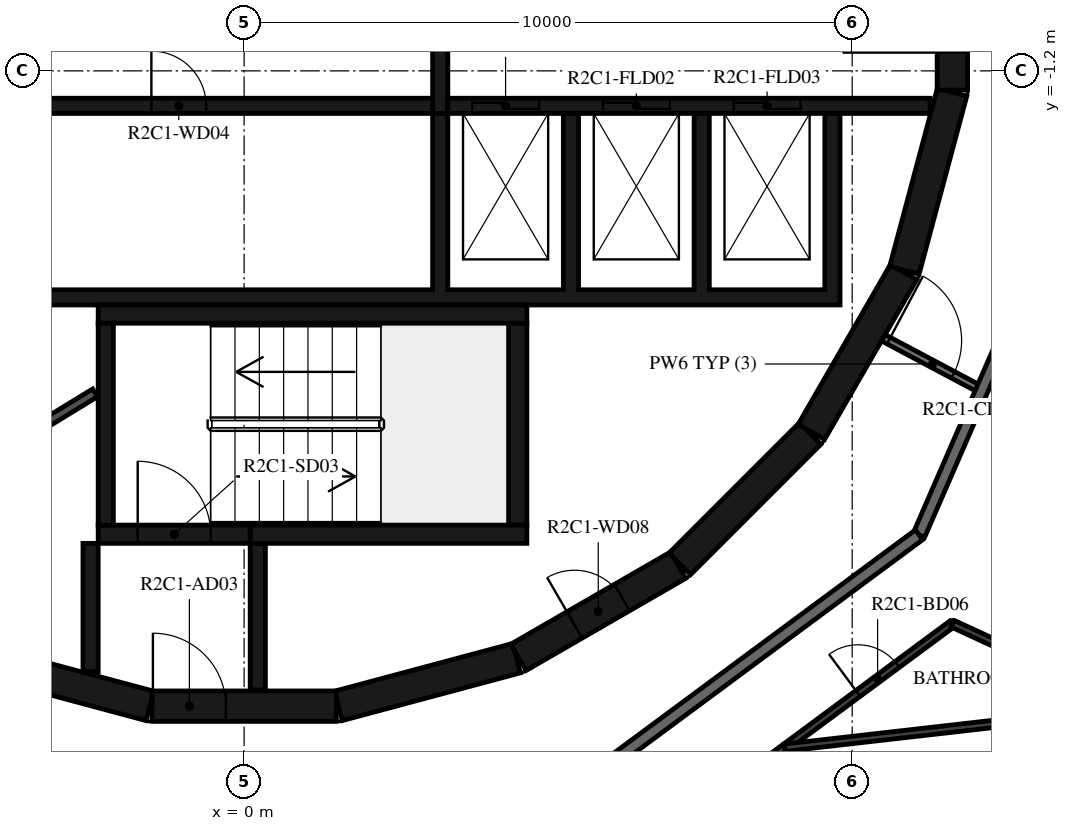
"""IFC4 building model, lengths in metres.
Left out: names, types, materials, properties, quantities, classifications, styles, units other than length and angle.
Written with IfcOpenShell. Run it as: python <this file> out.ifc"""

import sys

from ifc_helpers import new_model, si_unit, direction, frame, frame_2d, origin, place, context, subcontext, project, spatial, polyline, rectangle, outline, extrude, element, fill, save


model = new_model("IFC4")
c1 = context("Model", 3, precision=1e-05, world=origin(), true_north=direction((0.0, 1.0)))
c2 = subcontext(c1, "Body", "Model", "MODEL_VIEW")
j1 = project(units=[si_unit("LENGTHUNIT", "METRE"), si_unit("PLANEANGLEUNIT", "RADIAN")], contexts=[c1])
p1 = place(None, origin())
s1 = spatial("IfcSite", under=j1, at=p1, CompositionType="ELEMENT")
p2 = place(p1, origin())
s2 = spatial("IfcBuilding", under=s1, at=p2, CompositionType="ELEMENT")
p3 = place(p2, frame((0.0, 0.0, 101.2)))
s3 = spatial("IfcBuildingStorey", under=s2, at=p3, CompositionType="ELEMENT", Elevation=101.2)
p4 = place(p3, frame((1.55, -11.643, 0.0), z_axis=(0.0, 0.0, 1.0), x_axis=(0.965948410781, 0.258734743916, 0.0)))
e1 = element("IfcWall", 1, at=p4, inside=s3, PredefinedType="SHEAR", context=c2, shape_type="SweptSolid", body=[
    extrude(rectangle(XDim=3.033, YDim=0.5, at=frame_2d((1.516, 0.0))), origin(), (0.0, 0.0, 1.0), 3.12),
])
p5 = place(p3, frame((4.51, -10.845, 0.0), z_axis=(0.0, 0.0, 1.0), x_axis=(0.865975092491, 0.500087131594, 0.0)))
e2 = element("IfcWall", 2, at=p5, inside=s3, PredefinedType="SHEAR", context=c2, shape_type="SweptSolid", body=[
    extrude(rectangle(XDim=3.033, YDim=0.5, at=frame_2d((1.516, 0.0))), origin(), (0.0, 0.0, 1.0), 3.12),
])
p6 = place(p5, frame((1.066, 0.0, 0.0)))
e3 = element("IfcOpeningElement", 3, at=p6, cuts=e2, PredefinedType="OPENING", context=c2, shape_type="SweptSolid", body=[
    extrude(rectangle(XDim=0.9, YDim=2.1, at=frame_2d((0.45, 1.05))), frame((0.0, 0.26, 0.0), z_axis=(0.0, -1.0, 0.0), x_axis=(1.0, 0.0, 0.0)), (0.0, 0.0, 1.0), 0.52),
])
p7 = place(p3, frame((7.164, -9.308, 0.0), z_axis=(0.0, 0.0, 1.0), x_axis=(0.707106781187, 0.707106781187, 0.0)))
e4 = element("IfcWall", 4, at=p7, inside=s3, PredefinedType="SHEAR", context=c2, shape_type="SweptSolid", body=[
    extrude(rectangle(XDim=3.032, YDim=0.5, at=frame_2d((1.516, 0.0))), origin(), (0.0, 0.0, 1.0), 3.12),
])
for number, where, z_axis, x_axis in (
    (5, (9.329, -7.137, 0.0), (0.0, 0.0, 1.0), (0.5, 0.866, 0.0)),
    (6, (10.858, -4.479, 0.0), (0.0, 0.0, 1.0), (0.259, 0.966, 0.0)),
):
    element("IfcWall", number, at=place(p3, frame(where, z_axis=z_axis, x_axis=x_axis)), inside=s3, PredefinedType="SHEAR", context=c2, shape_type="SweptSolid", body=[
        extrude(rectangle(XDim=3.033, YDim=0.5, at=frame_2d((1.516, 0.0))), origin(), (0.0, 0.0, 1.0), 3.12),
    ])
p8 = place(p3, frame((11.647, -1.516, 0.0), z_axis=(0.0, 0.0, 1.0), x_axis=(0.0, 1.0, 0.0)))
e7 = element("IfcWall", 7, at=p8, inside=s3, PredefinedType="SHEAR", context=c2, shape_type="SweptSolid", body=[
    extrude(rectangle(XDim=3.033, YDim=0.5, at=frame_2d((1.516, 0.0))), origin(), (0.0, 0.0, 1.0), 3.12),
])
p9 = place(p8, frame((0.616, 0.0, 0.0)))
e8 = element("IfcOpeningElement", 8, at=p9, cuts=e7, PredefinedType="OPENING", context=c2, shape_type="SweptSolid", body=[
    extrude(rectangle(XDim=1.8, YDim=2.1, at=frame_2d((0.9, 1.05))), frame((0.0, 0.26, 0.0), z_axis=(0.0, -1.0, 0.0), x_axis=(1.0, 0.0, 0.0)), (0.0, 0.0, 1.0), 0.52),
])
p10 = place(p3, frame((-4.479, -10.858, 0.0), z_axis=(0.0, 0.0, 1.0), x_axis=(0.965948410781, -0.258734743916, 0.0)))
e9 = element("IfcWall", 9, at=p10, inside=s3, PredefinedType="SHEAR", context=c2, shape_type="SweptSolid", body=[
    extrude(rectangle(XDim=3.033, YDim=0.5, at=frame_2d((1.516, 0.0))), origin(), (0.0, 0.0, 1.0), 3.12),
])
p11 = place(p3, frame((-1.516, -11.647, 0.0), z_axis=(0.0, 0.0, 1.0), x_axis=(1.0, 0.0, 0.0)))
e10 = element("IfcWall", 10, at=p11, inside=s3, PredefinedType="SHEAR", context=c2, shape_type="SweptSolid", body=[
    extrude(rectangle(XDim=3.033, YDim=0.5, at=frame_2d((1.516, 0.0))), origin(), (0.0, 0.0, 1.0), 3.12),
])
p12 = place(p11, frame((0.016, 0.0, 0.0)))
e11 = element("IfcOpeningElement", 11, at=p12, cuts=e10, PredefinedType="OPENING", context=c2, shape_type="SweptSolid", body=[
    extrude(rectangle(XDim=1.2, YDim=2.1, at=frame_2d((0.6, 1.05))), frame((0.0, 0.26, 0.0), z_axis=(0.0, -1.0, 0.0), x_axis=(1.0, 0.0, 0.0)), (0.0, 0.0, 1.0), 0.52),
])
p13 = place(p3, frame((-2.275, -8.67, 0.0), z_axis=(0.0, 0.0, 1.0), x_axis=(0.0, 1.0, 0.0)))
e12 = element("IfcWall", 12, at=p13, inside=s3, PredefinedType="SHEAR", context=c2, shape_type="SweptSolid", body=[
    extrude(rectangle(XDim=3.32, YDim=0.25, at=frame_2d((1.66, 0.0))), origin(), (0.0, 0.0, 1.0), 3.12),
])
p14 = place(p3, frame((-2.4, -5.2, 0.0), z_axis=(0.0, 0.0, 1.0), x_axis=(1.0, 0.0, 0.0)))
e13 = element("IfcWall", 13, at=p14, inside=s3, PredefinedType="SHEAR", context=c2, shape_type="SweptSolid", body=[
    extrude(rectangle(XDim=7.05, YDim=0.3, at=frame_2d((3.525, 0.0))), origin(), (0.0, 0.0, 1.0), 3.12),
])
p15 = place(p3, frame((4.5, -8.67, 0.0), z_axis=(0.0, 0.0, 1.0), x_axis=(0.0, 1.0, 0.0)))
e14 = element("IfcWall", 14, at=p15, inside=s3, PredefinedType="SHEAR", context=c2, shape_type="SweptSolid", body=[
    extrude(rectangle(XDim=3.32, YDim=0.3, at=frame_2d((1.66, 0.0))), origin(), (0.0, 0.0, 1.0), 3.12),
])
p16 = place(p3, frame((0.1, -8.82, 0.0), z_axis=(0.0, 0.0, 1.0), x_axis=(1.0, 0.0, 0.0)))
e15 = element("IfcWall", 15, at=p16, inside=s3, PredefinedType="SHEAR", context=c2, shape_type="SweptSolid", body=[
    extrude(rectangle(XDim=4.55, YDim=0.3, at=frame_2d((2.275, 0.0))), origin(), (0.0, 0.0, 1.0), 3.12),
])
p17 = place(p3, frame((-2.4, -8.82, 0.0), z_axis=(0.0, 0.0, 1.0), x_axis=(1.0, 0.0, 0.0)))
e16 = element("IfcWall", 16, at=p17, inside=s3, PredefinedType="SHEAR", context=c2, shape_type="SweptSolid", body=[
    extrude(rectangle(XDim=2.5, YDim=0.3, at=frame_2d((1.25, 0.0))), origin(), (0.0, 0.0, 1.0), 3.12),
])
p18 = place(p17, frame((0.65, 0.0, 0.0)))
e17 = element("IfcOpeningElement", 17, at=p18, cuts=e16, PredefinedType="OPENING", context=c2, shape_type="SweptSolid", body=[
    extrude(rectangle(XDim=1.2, YDim=2.1, at=frame_2d((0.6, 1.05))), frame((0.0, 0.16, 0.0), z_axis=(0.0, -1.0, 0.0), x_axis=(1.0, 0.0, 0.0)), (0.0, 0.0, 1.0), 0.32),
])
p19 = place(p3, frame((-2.525, -8.97, 0.0), z_axis=(0.0, 0.0, 1.0), x_axis=(0.0, -1.0, 0.0)))
e18 = element("IfcWall", 18, at=p19, inside=s3, PredefinedType="SHEAR", context=c2, shape_type="SweptSolid", body=[
    extrude(rectangle(XDim=2.11, YDim=0.25, at=frame_2d((1.055, 0.0))), origin(), (0.0, 0.0, 1.0), 3.12),
])
p20 = place(p3, frame((0.225, -8.97, 0.0), z_axis=(0.0, 0.0, 1.0), x_axis=(0.0, -1.0, 0.0)))
e19 = element("IfcWall", 19, at=p20, inside=s3, PredefinedType="SHEAR", context=c2, shape_type="SweptSolid", body=[
    extrude(rectangle(XDim=2.41, YDim=0.25, at=frame_2d((1.205, 0.0))), origin(), (0.0, 0.0, 1.0), 3.12),
])
p21 = place(p3, origin())
e20 = element("IfcWall", 20, at=p21, inside=s3, PredefinedType="SHEAR", context=c2, shape_type="SweptSolid", body=[
    extrude(outline(polyline([(9.8, -5.05), (9.8, -4.8), (9.8, -1.9), (9.55, -1.9), (9.55, -4.8), (7.65, -4.8), (7.65, -1.9), (7.4, -1.9), (7.4, -4.8), (5.5, -4.8), (5.5, -1.9), (5.25, -1.9), (5.25, -4.8), (3.35, -4.8), (3.35, -1.9), (3.1, -1.9), (3.1, -4.8), (-5.25, -4.8), (-5.25, -1.9), (-5.5, -1.9), (-5.5, -4.8), (-7.4, -4.8), (-7.4, -1.9), (-7.65, -1.9), (-7.65, -4.8), (-9.55, -4.8), (-9.55, -1.9), (-9.8, -1.9), (-9.8, -4.8), (-9.8, -5.05), (9.8, -5.05)])), origin(), (0.0, 0.0, 1.0), 3.12),
])
p22 = place(p3, frame((-11.28, -1.775, 0.0), z_axis=(0.0, 0.0, 1.0), x_axis=(1.0, 0.0, 0.0)))
e21 = element("IfcWall", 21, at=p22, inside=s3, PredefinedType="SHEAR", context=c2, shape_type="SweptSolid", body=[
    extrude(rectangle(XDim=14.38, YDim=0.25, at=frame_2d((7.19, 0.0))), origin(), (0.0, 0.0, 1.0), 3.12),
])
p23 = place(p22, frame((9.755, 0.0, 0.0)))
e22 = element("IfcOpeningElement", 22, at=p23, cuts=e21, PredefinedType="OPENING", context=c2, shape_type="SweptSolid", body=[
    extrude(rectangle(XDim=0.9, YDim=2.1, at=frame_2d((0.45, 1.05))), frame((0.0, 0.135, 0.0), z_axis=(0.0, -1.0, 0.0), x_axis=(1.0, 0.0, 0.0)), (0.0, 0.0, 1.0), 0.27),
])
p24 = place(p3, frame((3.35, -1.775, 0.0), z_axis=(0.0, 0.0, 1.0), x_axis=(1.0, 0.0, 0.0)))
e23 = element("IfcWall", 23, at=p24, inside=s3, PredefinedType="SHEAR", context=c2, shape_type="SweptSolid", body=[
    extrude(rectangle(XDim=7.93, YDim=0.25, at=frame_2d((3.965, 0.0))), origin(), (0.0, 0.0, 1.0), 3.12),
])
p25 = place(p24, frame((0.4, 0.0, 0.0)))
e24 = element("IfcOpeningElement", 24, at=p25, cuts=e23, PredefinedType="OPENING", context=c2, shape_type="SweptSolid", body=[
    extrude(rectangle(XDim=1.1, YDim=2.4, at=frame_2d((0.55, 1.2))), frame((0.0, 0.135, 0.0), z_axis=(0.0, -1.0, 0.0), x_axis=(1.0, 0.0, 0.0)), (0.0, 0.0, 1.0), 0.27),
])
p26 = place(p24, frame((2.55, 0.0, 0.0)))
e25 = element("IfcOpeningElement", 25, at=p26, cuts=e23, PredefinedType="OPENING", context=c2, shape_type="SweptSolid", body=[
    extrude(rectangle(XDim=1.1, YDim=2.4, at=frame_2d((0.55, 1.2))), frame((0.0, 0.135, 0.0), z_axis=(0.0, -1.0, 0.0), x_axis=(1.0, 0.0, 0.0)), (0.0, 0.0, 1.0), 0.27),
])
p27 = place(p24, frame((4.7, 0.0, 0.0)))
e26 = element("IfcOpeningElement", 26, at=p27, cuts=e23, PredefinedType="OPENING", context=c2, shape_type="SweptSolid", body=[
    extrude(rectangle(XDim=1.1, YDim=2.4, at=frame_2d((0.55, 1.2))), frame((0.0, 0.135, 0.0), z_axis=(0.0, -1.0, 0.0), x_axis=(1.0, 0.0, 0.0)), (0.0, 0.0, 1.0), 0.27),
])
p28 = place(p3, frame((3.225, -1.9, 0.0), z_axis=(0.0, 0.0, 1.0), x_axis=(0.0, 1.0, 0.0)))
e27 = element("IfcWall", 27, at=p28, inside=s3, PredefinedType="SHEAR", context=c2, shape_type="SweptSolid", body=[
    extrude(rectangle(XDim=3.8, YDim=0.25, at=frame_2d((1.9, 0.0))), origin(), (0.0, 0.0, 1.0), 3.12),
])
p29 = place(p3, frame((-2.451, -6.495, 0.0), z_axis=(0.0, 0.0, 1.0), x_axis=(-0.853250115418, -0.521501908471, 0.0)))
e28 = element("IfcWall", 28, at=p29, inside=s3, PredefinedType="PARTITIONING", context=c2, shape_type="SweptSolid", body=[
    extrude(rectangle(XDim=5.137, YDim=0.15, at=frame_2d((2.569, 0.0))), origin(), (0.0, 0.0, 1.0), 3.12),
])
p30 = place(p29, frame((2.119, 0.0, 0.0)))
e29 = element("IfcOpeningElement", 29, at=p30, cuts=e28, PredefinedType="OPENING", context=c2, shape_type="SweptSolid", body=[
    extrude(rectangle(XDim=0.9, YDim=2.1, at=frame_2d((0.45, 1.05))), frame((0.0, 0.085, 0.0), z_axis=(0.0, -1.0, 0.0), x_axis=(1.0, 0.0, 0.0)), (0.0, 0.0, 1.0), 0.17),
])
p31 = place(p3, frame((10.511, -5.589, 0.0), z_axis=(0.0, 0.0, 1.0), x_axis=(0.882962602189, -0.469443333253, 0.0)))
e30 = element("IfcWall", 30, at=p31, inside=s3, PredefinedType="PARTITIONING", context=c2, shape_type="SweptSolid", body=[
    extrude(rectangle(XDim=1.838, YDim=0.12, at=frame_2d((0.919, 0.0))), origin(), (0.0, 0.0, 1.0), 3.12),
])
p32 = place(p31, frame((0.1, 0.0, 0.0)))
e31 = element("IfcOpeningElement", 31, at=p32, cuts=e30, PredefinedType="OPENING", context=c2, shape_type="SweptSolid", body=[
    extrude(rectangle(XDim=1.2, YDim=2.1, at=frame_2d((0.6, 1.05))), frame((0.0, 0.07, 0.0), z_axis=(0.0, -1.0, 0.0), x_axis=(1.0, 0.0, 0.0)), (0.0, 0.0, 1.0), 0.14),
])
p33 = place(p3, frame((11.1, -8.829, 0.0), z_axis=(0.0, 0.0, 1.0), x_axis=(0.398741918631, 0.917063183388, 0.0)))
e32 = element("IfcWall", 32, at=p33, inside=s3, PredefinedType="STANDARD", context=c2, shape_type="SweptSolid", body=[
    extrude(rectangle(XDim=7.342, YDim=0.2, at=frame_2d((3.671, 0.0))), origin(), (0.0, 0.0, 1.0), 3.12),
])
p34 = place(p3, frame((-8.829, -11.1, 0.0), z_axis=(0.0, 0.0, 1.0), x_axis=(0.917063622491, -0.398740908742, 0.0)))
e33 = element("IfcWall", 33, at=p34, inside=s3, PredefinedType="STANDARD", context=c2, shape_type="SweptSolid", body=[
    extrude(rectangle(XDim=7.24, YDim=0.2, at=frame_2d((3.62, 0.0))), origin(), (0.0, 0.0, 1.0), 3.12),
])
p35 = place(p34, frame((6.04, 0.0, 0.0)))
e34 = element("IfcOpeningElement", 34, at=p35, cuts=e33, PredefinedType="OPENING", context=c2, shape_type="SweptSolid", body=[
    extrude(rectangle(XDim=1.0, YDim=2.1, at=frame_2d((0.5, 1.05))), frame((0.0, 0.11, 0.0), z_axis=(0.0, -1.0, 0.0), x_axis=(1.0, 0.0, 0.0)), (0.0, 0.0, 1.0), 0.22),
])
p36 = place(p3, frame((5.198, -13.196, 0.0), z_axis=(0.0, 0.0, 1.0), x_axis=(0.803869883159, 0.594805187394, 0.0)))
e35 = element("IfcWall", 35, at=p36, inside=s3, PredefinedType="STANDARD", context=c2, shape_type="SweptSolid", body=[
    extrude(rectangle(XDim=7.342, YDim=0.2, at=frame_2d((3.671, 0.0))), origin(), (0.0, 0.0, 1.0), 3.12),
])
p37 = place(p3, frame((-9.562, -12.417, 0.0), z_axis=(0.0, 0.0, 1.0), x_axis=(0.917063169851, -0.398741949767, 0.0)))
e36 = element("IfcWall", 36, at=p37, inside=s3, PredefinedType="PARTITIONING", context=c2, shape_type="SweptSolid", body=[
    extrude(rectangle(XDim=7.891, YDim=0.12, at=frame_2d((3.946, 0.0))), origin(), (0.0, 0.0, 1.0), 3.12),
])
p38 = place(p37, frame((0.715, 0.0, 0.0)))
e37 = element("IfcOpeningElement", 37, at=p38, cuts=e36, PredefinedType="OPENING", context=c2, shape_type="SweptSolid", body=[
    extrude(rectangle(XDim=0.8, YDim=2.1, at=frame_2d((0.4, 1.05))), frame((0.0, 0.07, 0.0), z_axis=(0.0, -1.0, 0.0), x_axis=(1.0, 0.0, 0.0)), (0.0, 0.0, 1.0), 0.14),
])
p39 = place(p3, frame((5.767, -14.641, 0.0), z_axis=(0.0, 0.0, 1.0), x_axis=(0.803867427863, 0.594808505673, 0.0)))
e38 = element("IfcWall", 38, at=p39, inside=s3, PredefinedType="PARTITIONING", context=c2, shape_type="SweptSolid", body=[
    extrude(rectangle(XDim=7.316, YDim=0.12, at=frame_2d((3.658, 0.0))), origin(), (0.0, 0.0, 1.0), 3.12),
])
p40 = place(p39, frame((0.2, 0.0, 0.0)))
e39 = element("IfcOpeningElement", 39, at=p40, cuts=e38, PredefinedType="OPENING", context=c2, shape_type="SweptSolid", body=[
    extrude(rectangle(XDim=0.9, YDim=2.1, at=frame_2d((0.45, 1.05))), frame((0.0, 0.07, 0.0), z_axis=(0.0, -1.0, 0.0), x_axis=(1.0, 0.0, 0.0)), (0.0, 0.0, 1.0), 0.14),
])
p41 = place(p39, frame((5.385, 0.0, 0.0)))
e40 = element("IfcOpeningElement", 40, at=p41, cuts=e38, PredefinedType="OPENING", context=c2, shape_type="SweptSolid", body=[
    extrude(rectangle(XDim=0.8, YDim=2.1, at=frame_2d((0.4, 1.05))), frame((0.0, 0.07, 0.0), z_axis=(0.0, -1.0, 0.0), x_axis=(1.0, 0.0, 0.0)), (0.0, 0.0, 1.0), 0.14),
])
p42 = place(p3, frame((11.649, -10.289, 0.0), z_axis=(0.0, 0.0, 1.0), x_axis=(0.9079269461, -0.419128453514, 0.0)))
e41 = element("IfcWall", 41, at=p42, inside=s3, PredefinedType="PARTITIONING", context=c2, shape_type="SweptSolid", body=[
    extrude(rectangle(XDim=3.304, YDim=0.12, at=frame_2d((1.652, 0.0))), origin(), (0.0, 0.0, 1.0), 3.12),
])
p43 = place(p3, frame((14.649, -11.674, 0.0), z_axis=(0.0, 0.0, 1.0), x_axis=(-0.993573746873, -0.113186613721, 0.0)))
e42 = element("IfcWall", 42, at=p43, inside=s3, PredefinedType="PARTITIONING", context=c2, shape_type="SweptSolid", body=[
    extrude(rectangle(XDim=5.796, YDim=0.12, at=frame_2d((2.898, 0.0))), origin(), (0.0, 0.0, 1.0), 3.12),
])
p44 = place(p18, origin())
e43 = element("IfcDoor", 43, at=p44, inside=s3, OperationType="SINGLE_SWING_LEFT", PredefinedType="DOOR", context=c2, shape_type="SweptSolid", body=[
    extrude(rectangle(XDim=1.2, YDim=2.1, at=frame_2d((0.6, 1.05))), frame((0.0, 0.025, 0.0), z_axis=(0.0, -1.0, 0.0), x_axis=(1.0, 0.0, 0.0)), (0.0, 0.0, 1.0), 0.05),
])
fill(e17, e43)
p45 = place(p12, origin())
e44 = element("IfcDoor", 44, at=p45, inside=s3, OperationType="SINGLE_SWING_RIGHT", PredefinedType="DOOR", context=c2, shape_type="SweptSolid", body=[
    extrude(rectangle(XDim=1.2, YDim=2.1, at=frame_2d((0.6, 1.05))), frame((0.0, 0.025, 0.0), z_axis=(0.0, -1.0, 0.0), x_axis=(1.0, 0.0, 0.0)), (0.0, 0.0, 1.0), 0.05),
])
fill(e11, e44)
p46 = place(p9, origin())
e45 = element("IfcDoor", 45, at=p46, inside=s3, OperationType="DOUBLE_DOOR_SINGLE_SWING", PredefinedType="DOOR", context=c2, shape_type="SweptSolid", body=[
    extrude(rectangle(XDim=1.8, YDim=2.1, at=frame_2d((0.9, 1.05))), frame((0.0, 0.025, 0.0), z_axis=(0.0, -1.0, 0.0), x_axis=(1.0, 0.0, 0.0)), (0.0, 0.0, 1.0), 0.05),
])
fill(e8, e45)
p47 = place(p25, origin())
e46 = element("IfcDoor", 46, at=p47, inside=s3, OperationType="DOUBLE_DOOR_SLIDING", PredefinedType="DOOR", context=c2, shape_type="SweptSolid", body=[
    extrude(rectangle(XDim=1.1, YDim=2.4, at=frame_2d((0.55, 1.2))), frame((0.0, 0.025, 0.0), z_axis=(0.0, -1.0, 0.0), x_axis=(1.0, 0.0, 0.0)), (0.0, 0.0, 1.0), 0.05),
])
fill(e24, e46)
p48 = place(p26, origin())
e47 = element("IfcDoor", 47, at=p48, inside=s3, OperationType="DOUBLE_DOOR_SLIDING", PredefinedType="DOOR", context=c2, shape_type="SweptSolid", body=[
    extrude(rectangle(XDim=1.1, YDim=2.4, at=frame_2d((0.55, 1.2))), frame((0.0, 0.025, 0.0), z_axis=(0.0, -1.0, 0.0), x_axis=(1.0, 0.0, 0.0)), (0.0, 0.0, 1.0), 0.05),
])
fill(e25, e47)
p49 = place(p27, origin())
e48 = element("IfcDoor", 48, at=p49, inside=s3, OperationType="DOUBLE_DOOR_SLIDING", PredefinedType="DOOR", context=c2, shape_type="SweptSolid", body=[
    extrude(rectangle(XDim=1.1, YDim=2.4, at=frame_2d((0.55, 1.2))), frame((0.0, 0.025, 0.0), z_axis=(0.0, -1.0, 0.0), x_axis=(1.0, 0.0, 0.0)), (0.0, 0.0, 1.0), 0.05),
])
fill(e26, e48)
p50 = place(p23, origin())
e49 = element("IfcDoor", 49, at=p50, inside=s3, OperationType="SINGLE_SWING_LEFT", PredefinedType="DOOR", context=c2, shape_type="SweptSolid", body=[
    extrude(rectangle(XDim=0.9, YDim=2.1, at=frame_2d((0.45, 1.05))), frame((0.0, 0.025, 0.0), z_axis=(0.0, -1.0, 0.0), x_axis=(1.0, 0.0, 0.0)), (0.0, 0.0, 1.0), 0.05),
])
fill(e22, e49)
p51 = place(p6, origin())
e50 = element("IfcDoor", 50, at=p51, inside=s3, OperationType="SINGLE_SWING_LEFT", PredefinedType="DOOR", context=c2, shape_type="SweptSolid", body=[
    extrude(rectangle(XDim=0.9, YDim=2.1, at=frame_2d((0.45, 1.05))), frame((0.0, 0.025, 0.0), z_axis=(0.0, -1.0, 0.0), x_axis=(1.0, 0.0, 0.0)), (0.0, 0.0, 1.0), 0.05),
])
fill(e3, e50)
p52 = place(p41, origin())
e51 = element("IfcDoor", 51, at=p52, inside=s3, OperationType="SINGLE_SWING_RIGHT", PredefinedType="DOOR", context=c2, shape_type="SweptSolid", body=[
    extrude(rectangle(XDim=0.8, YDim=2.1, at=frame_2d((0.4, 1.05))), frame((0.0, 0.025, 0.0), z_axis=(0.0, -1.0, 0.0), x_axis=(1.0, 0.0, 0.0)), (0.0, 0.0, 1.0), 0.05),
])
fill(e40, e51)
p53 = place(p32, origin())
e52 = element("IfcDoor", 52, at=p53, inside=s3, OperationType="DOUBLE_DOOR_SINGLE_SWING", PredefinedType="DOOR", context=c2, shape_type="SweptSolid", body=[
    extrude(rectangle(XDim=1.2, YDim=2.1, at=frame_2d((0.6, 1.05))), frame((0.0, 0.025, 0.0), z_axis=(0.0, -1.0, 0.0), x_axis=(1.0, 0.0, 0.0)), (0.0, 0.0, 1.0), 0.05),
])
fill(e31, e52)
save(model, sys.argv[1])
